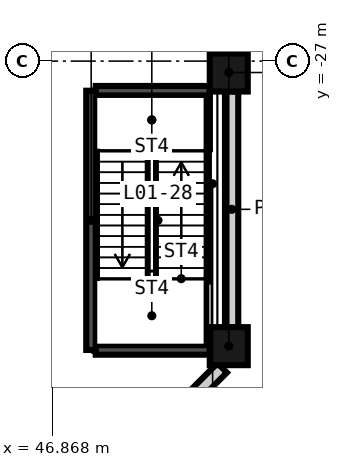
"""IFC4 building model, lengths in metres.
Left out: names, types, materials, properties, quantities, classifications, styles, units other than length and angle.
Written with IfcOpenShell. Run it as: python <this file> out.ifc"""

import sys

from ifc_helpers import new_model, si_unit, direction, frame, frame_2d, origin, origin_2d, place, context, subcontext, project, spatial, rectangle, extrude, element, save


model = new_model("IFC4")
c1 = context("Model", 3, precision=1e-05, world=origin(), true_north=direction((0.0, 1.0)))
c2 = subcontext(c1, "Body", "Model", "MODEL_VIEW")
j1 = project(units=[si_unit("LENGTHUNIT", "METRE"), si_unit("PLANEANGLEUNIT", "RADIAN")], contexts=[c1])
p1 = place(None, origin())
s1 = spatial("IfcSite", under=j1, at=p1, CompositionType="ELEMENT")
p2 = place(p1, origin())
s2 = spatial("IfcBuilding", under=s1, at=p2, CompositionType="ELEMENT")
p3 = place(p2, frame((0.0, 0.0, 9.0)))
s3 = spatial("IfcBuildingStorey", under=s2, at=p3, CompositionType="ELEMENT", Elevation=9.0)
for number, where, z_axis, x_axis in (
    (1, (51.5, -34.5, -0.4), (0.0, 0.0, 1.0), (0.0, 1.0, 0.0)),
    (2, (51.5, -27.3, -0.4), (0.0, 0.0, 1.0), (0.0, 1.0, 0.0)),
):
    element("IfcColumn", number, at=place(p3, frame(where, z_axis=z_axis, x_axis=x_axis)), inside=s3, PredefinedType="COLUMN", context=c2, shape_type="SweptSolid", body=[
        extrude(rectangle(XDim=1.0, YDim=1.0, at=origin_2d()), origin(), (0.0, 0.0, 1.0), 9.0),
    ])
p4 = place(p3, frame((46.072, -40.327, -0.4), z_axis=(0.0, 0.0, 1.0), x_axis=(0.707106781187, 0.707106781187, 0.0)))
e3 = element("IfcWall", 3, at=p4, inside=s3, PredefinedType="SOLIDWALL", context=c2, shape_type="SweptSolid", body=[
    extrude(rectangle(XDim=7.433, YDim=0.35, at=frame_2d((3.716, 0.0))), origin(), (0.0, 0.0, 1.0), 8.1),
])
p5 = place(p3, frame((51.575, -34.0, -0.4), z_axis=(0.0, 0.0, 1.0), x_axis=(0.0, 1.0, 0.0)))
e4 = element("IfcWall", 4, at=p5, inside=s3, PredefinedType="SOLIDWALL", context=c2, shape_type="SweptSolid", body=[
    extrude(rectangle(XDim=6.2, YDim=0.35, at=frame_2d((3.1, 0.0))), origin(), (0.0, 0.0, 1.0), 8.1),
])
for number, where, z_axis, x_axis in (
    (5, (48.0, -34.6, 0.0), (0.0, 0.0, 1.0), (1.0, 0.0, 0.0)),
    (6, (48.0, -27.779, 0.0), (0.0, 0.0, 1.0), (1.0, 0.0, 0.0)),
):
    element("IfcWall", number, at=place(p3, frame(where, z_axis=z_axis, x_axis=x_axis)), inside=s3, PredefinedType="SHEAR", context=c2, shape_type="SweptSolid", body=[
        extrude(rectangle(XDim=3.0, YDim=0.25, at=frame_2d((1.5, 0.0))), origin(), (0.0, 0.0, 1.0), 8.6),
    ])
p6 = place(p3, frame((47.875, -34.6, 0.0), z_axis=(0.0, 0.0, 1.0), x_axis=(0.0, 1.0, 0.0)))
e7 = element("IfcWall", 7, at=p6, inside=s3, PredefinedType="SHEAR", context=c2, shape_type="SweptSolid", body=[
    extrude(rectangle(XDim=6.821, YDim=0.25, at=frame_2d((3.411, 0.0))), origin(), (0.0, 0.0, 1.0), 8.6),
])
save(model, sys.argv[1])
